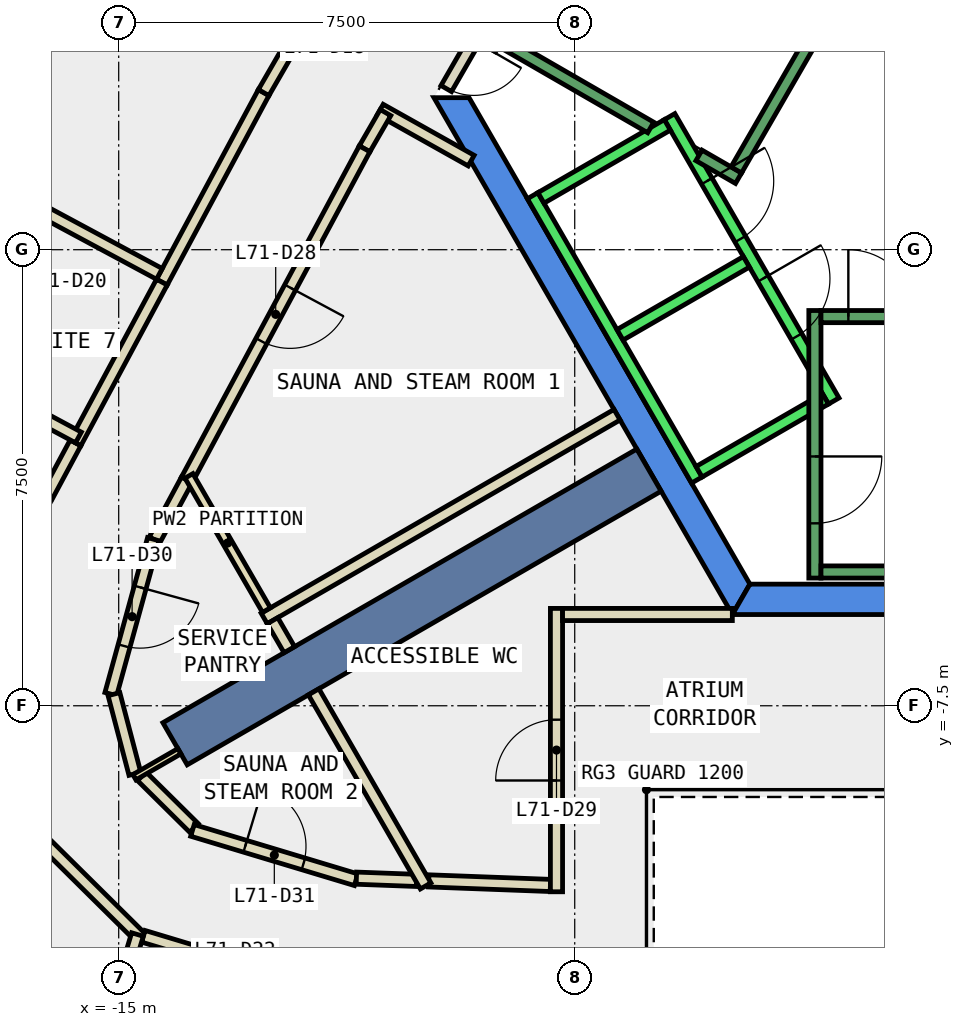
"""IFC4 building model, lengths in metres.
Left out: names, types, materials, properties, quantities, classifications, styles, units other than length and angle.
Written with IfcOpenShell. Run it as: python <this file> out.ifc"""

import sys

from ifc_helpers import new_model, si_unit, direction, frame, frame_2d, origin, place, context, subcontext, project, spatial, polyline, rectangle, outline, extrude, element, fill, save


model = new_model("IFC4")
c1 = context("Model", 3, precision=1e-05, world=origin(), true_north=direction((0.0, 1.0)))
c2 = subcontext(c1, "Body", "Model", "MODEL_VIEW")
j1 = project(units=[si_unit("LENGTHUNIT", "METRE"), si_unit("PLANEANGLEUNIT", "RADIAN")], contexts=[c1])
p1 = place(None, origin())
s1 = spatial("IfcSite", under=j1, at=p1, CompositionType="ELEMENT")
p2 = place(p1, origin())
s2 = spatial("IfcBuilding", under=s1, at=p2, CompositionType="ELEMENT")
p3 = place(p2, frame((0.0, 0.0, 304.4)))
s3 = spatial("IfcBuildingStorey", under=s2, at=p3, CompositionType="ELEMENT", Elevation=304.4)
p4 = place(p3, frame((0.0, 0.0, -0.34)))
e1 = element("IfcWall", 1, at=p4, inside=s3, PredefinedType="SHEAR", context=c2, shape_type="SweptSolid", body=[
    extrude(outline(polyline([(-9.236, 3.502), (-8.803, 3.253), (-4.619, 10.5), (-4.907, 11.0), (-9.236, 3.502)])), origin(), (0.0, 0.0, 1.0), 3.6),
])
p5 = place(p3, frame((0.0, 0.0, -0.34)))
e2 = element("IfcWall", 2, at=p5, inside=s3, PredefinedType="SHEAR", context=c2, shape_type="SweptSolid", body=[
    extrude(outline(polyline([(-9.815, 2.5), (-4.907, -6.0), (-4.619, -5.5), (-9.238, 2.5), (-9.815, 2.5)])), origin(), (0.0, 0.0, 1.0), 3.6),
])
p6 = place(p3, frame((0.0, 0.0, -0.34)))
e3 = element("IfcWall", 3, at=p6, inside=s3, PredefinedType="SHEAR", context=c2, shape_type="SweptSolid", body=[
    extrude(outline(polyline([(3.75, -6.0), (3.75, -5.5), (-4.619, -5.5), (-4.907, -6.0), (3.75, -6.0)])), origin(), (0.0, 0.0, 1.0), 3.6),
])
p7 = place(p3, frame((-6.279, -3.625, -0.34), z_axis=(0.0, 0.0, 1.0), x_axis=(-0.866017533419, -0.500013631625, 0.0)))
e4 = element("IfcWall", 4, at=p7, inside=s3, PredefinedType="SHEAR", context=c2, shape_type="SweptSolid", body=[
    extrude(rectangle(XDim=9.0, YDim=0.8, at=frame_2d((4.5, 0.0))), origin(), (0.0, 0.0, 1.0), 3.6),
])
p8 = place(p3, frame((-9.203, 1.465, 0.0), z_axis=(0.0, 0.0, 1.0), x_axis=(-0.872243753731, 0.489071399775, 0.0)))
e5 = element("IfcWall", 5, at=p8, inside=s3, PredefinedType="PARTITIONING", context=c2, shape_type="SweptSolid", body=[
    extrude(rectangle(XDim=1.715, YDim=0.2, at=frame_2d((0.858, 0.0))), origin(), (0.0, 0.0, 1.0), 3.26),
])
p9 = place(p3, frame((-10.612, 2.255, 0.0), z_axis=(0.0, 0.0, 1.0), x_axis=(-0.499916971989, -0.866073334723, 0.0)))
e6 = element("IfcWall", 6, at=p9, inside=s3, PredefinedType="PARTITIONING", context=c2, shape_type="SweptSolid", body=[
    extrude(rectangle(XDim=0.688, YDim=0.2, at=frame_2d((0.344, 0.0))), origin(), (0.0, 0.0, 1.0), 3.26),
])
p10 = place(p3, frame((-10.956, 1.659, 0.0), z_axis=(0.0, 0.0, 1.0), x_axis=(-0.473095976848, -0.881010894762, 0.0)))
e7 = element("IfcWall", 7, at=p10, inside=s3, PredefinedType="PARTITIONING", context=c2, shape_type="SweptSolid", body=[
    extrude(rectangle(XDim=6.18, YDim=0.2, at=frame_2d((3.09, 0.0))), origin(), (0.0, 0.0, 1.0), 3.26),
])
p11 = place(p10, frame((2.59, 0.0, 0.0)))
e8 = element("IfcOpeningElement", 8, at=p11, cuts=e7, PredefinedType="OPENING", context=c2, shape_type="SweptSolid", body=[
    extrude(rectangle(XDim=1.0, YDim=2.1, at=frame_2d((0.5, 1.05))), frame((0.0, 0.11, 0.0), z_axis=(0.0, -1.0, 0.0), x_axis=(1.0, 0.0, 0.0)), (0.0, 0.0, 1.0), 0.22),
])
p12 = place(p3, frame((-9.902, -10.38, 0.0), z_axis=(0.0, 0.0, 1.0), x_axis=(0.999295503749, -0.037529937222, 0.0)))
e9 = element("IfcWall", 9, at=p12, inside=s3, PredefinedType="PARTITIONING", context=c2, shape_type="SweptSolid", body=[
    extrude(rectangle(XDim=2.004, YDim=0.2, at=frame_2d((1.002, 0.0))), origin(), (0.0, 0.0, 1.0), 3.26),
])
p13 = place(p3, frame((-13.88, -3.786, 0.0), z_axis=(0.0, 0.0, 1.0), x_axis=(-0.473500327913, -0.880793641817, 0.0)))
e10 = element("IfcWall", 10, at=p13, inside=s3, PredefinedType="PARTITIONING", context=c2, shape_type="SweptSolid", body=[
    extrude(rectangle(XDim=1.117, YDim=0.2, at=frame_2d((0.559, 0.0))), origin(), (0.0, 0.0, 1.0), 3.26),
])
p14 = place(p3, frame((-14.429, -4.761, 0.0), z_axis=(0.0, 0.0, 1.0), x_axis=(-0.265321869293, -0.964159896321, 0.0)))
e11 = element("IfcWall", 11, at=p14, inside=s3, PredefinedType="PARTITIONING", context=c2, shape_type="SweptSolid", body=[
    extrude(rectangle(XDim=2.642, YDim=0.2, at=frame_2d((1.321, 0.0))), origin(), (0.0, 0.0, 1.0), 3.26),
])
p15 = place(p14, frame((0.821, 0.0, 0.0)))
e12 = element("IfcOpeningElement", 12, at=p15, cuts=e11, PredefinedType="OPENING", context=c2, shape_type="SweptSolid", body=[
    extrude(rectangle(XDim=1.0, YDim=2.1, at=frame_2d((0.5, 1.05))), frame((0.0, 0.11, 0.0), z_axis=(0.0, -1.0, 0.0), x_axis=(1.0, 0.0, 0.0)), (0.0, 0.0, 1.0), 0.22),
])
p16 = place(p3, frame((-15.078, -7.309, 0.0), z_axis=(0.0, 0.0, 1.0), x_axis=(0.254014079025, -0.967200520914, 0.0)))
e13 = element("IfcWall", 13, at=p16, inside=s3, PredefinedType="PARTITIONING", context=c2, shape_type="SweptSolid", body=[
    extrude(rectangle(XDim=1.354, YDim=0.2, at=frame_2d((0.677, 0.0))), origin(), (0.0, 0.0, 1.0), 3.26),
])
p17 = place(p3, frame((-14.62, -8.66, 0.0), z_axis=(0.0, 0.0, 1.0), x_axis=(0.710838137113, -0.703355630407, 0.0)))
e14 = element("IfcWall", 14, at=p17, inside=s3, PredefinedType="PARTITIONING", context=c2, shape_type="SweptSolid", body=[
    extrude(rectangle(XDim=1.207, YDim=0.2, at=frame_2d((0.604, 0.0))), origin(), (0.0, 0.0, 1.0), 3.26),
])
p18 = place(p3, frame((-13.787, -9.55, 0.0), z_axis=(0.0, 0.0, 1.0), x_axis=(0.957493454064, -0.288454997225, 0.0)))
e15 = element("IfcWall", 15, at=p18, inside=s3, PredefinedType="PARTITIONING", context=c2, shape_type="SweptSolid", body=[
    extrude(rectangle(XDim=2.812, YDim=0.2, at=frame_2d((1.406, 0.0))), origin(), (0.0, 0.0, 1.0), 3.26),
])
p19 = place(p18, frame((0.906, 0.0, 0.0)))
e16 = element("IfcOpeningElement", 16, at=p19, cuts=e15, PredefinedType="OPENING", context=c2, shape_type="SweptSolid", body=[
    extrude(rectangle(XDim=1.0, YDim=2.1, at=frame_2d((0.5, 1.05))), frame((0.0, 0.11, 0.0), z_axis=(0.0, -1.0, 0.0), x_axis=(1.0, 0.0, 0.0)), (0.0, 0.0, 1.0), 0.22),
])
p20 = place(p3, frame((-11.091, -10.335, 0.0), z_axis=(0.0, 0.0, 1.0), x_axis=(0.999296807198, -0.037495214686, 0.0)))
e17 = element("IfcWall", 17, at=p20, inside=s3, PredefinedType="PARTITIONING", context=c2, shape_type="SweptSolid", body=[
    extrude(rectangle(XDim=0.99, YDim=0.2, at=frame_2d((0.495, 0.0))), origin(), (0.0, 0.0, 1.0), 3.26),
])
p21 = place(p3, frame((-14.29, -0.533, 0.0), z_axis=(0.0, 0.0, 1.0), x_axis=(0.473161350875, 0.880975786295, 0.0)))
e18 = element("IfcWall", 18, at=p21, inside=s3, PredefinedType="PARTITIONING", context=c2, shape_type="SweptSolid", body=[
    extrude(rectangle(XDim=3.538, YDim=0.2, at=frame_2d((1.769, 0.0))), origin(), (0.0, 0.0, 1.0), 3.26),
])
p22 = place(p3, frame((-12.616, 2.584, 0.0), z_axis=(0.0, 0.0, 1.0), x_axis=(0.50008212199, 0.86597798544, 0.0)))
e19 = element("IfcWall", 19, at=p22, inside=s3, PredefinedType="PARTITIONING", context=c2, shape_type="SweptSolid", body=[
    extrude(rectangle(XDim=3.995, YDim=0.2, at=frame_2d((1.998, 0.0))), origin(), (0.0, 0.0, 1.0), 3.26),
])
p23 = place(p22, frame((1.498, 0.0, 0.0)))
e20 = element("IfcOpeningElement", 20, at=p23, cuts=e19, PredefinedType="OPENING", context=c2, shape_type="SweptSolid", body=[
    extrude(rectangle(XDim=1.0, YDim=2.1, at=frame_2d((0.5, 1.05))), frame((0.0, 0.11, 0.0), z_axis=(0.0, -1.0, 0.0), x_axis=(1.0, 0.0, 0.0)), (0.0, 0.0, 1.0), 0.22),
])
p24 = place(p3, frame((-16.184, -4.059, 0.0), z_axis=(0.0, 0.0, 1.0), x_axis=(0.473039108954, 0.881041430013, 0.0)))
e21 = element("IfcWall", 21, at=p24, inside=s3, PredefinedType="PARTITIONING", context=c2, shape_type="SweptSolid", body=[
    extrude(rectangle(XDim=1.002, YDim=0.2, at=frame_2d((0.501, 0.0))), origin(), (0.0, 0.0, 1.0), 3.26),
])
p25 = place(p3, frame((-15.71, -3.176, 0.0), z_axis=(0.0, 0.0, 1.0), x_axis=(0.473255284848, 0.880925329051, 0.0)))
e22 = element("IfcWall", 22, at=p25, inside=s3, PredefinedType="PARTITIONING", context=c2, shape_type="SweptSolid", body=[
    extrude(rectangle(XDim=3.0, YDim=0.2, at=frame_2d((1.5, 0.0))), origin(), (0.0, 0.0, 1.0), 3.26),
])
p26 = place(p3, frame((-14.62, -11.333, 0.0), z_axis=(0.0, 0.0, 1.0), x_axis=(-0.710808598142, 0.703385482369, 0.0)))
e23 = element("IfcWall", 23, at=p26, inside=s3, PredefinedType="PARTITIONING", context=c2, shape_type="SweptSolid", body=[
    extrude(rectangle(XDim=2.697, YDim=0.2, at=frame_2d((1.349, 0.0))), origin(), (0.0, 0.0, 1.0), 3.26),
])
p27 = place(p3, frame((-12.968, -11.781, 0.0), z_axis=(0.0, 0.0, 1.0), x_axis=(-0.957517271828, 0.288375925054, 0.0)))
e24 = element("IfcWall", 24, at=p27, inside=s3, PredefinedType="PARTITIONING", context=c2, shape_type="SweptSolid", body=[
    extrude(rectangle(XDim=1.699, YDim=0.2, at=frame_2d((0.85, 0.0))), origin(), (0.0, 0.0, 1.0), 3.26),
])
p28 = place(p3, frame((-2.54, 5.1, 0.0), z_axis=(0.0, 0.0, 1.0), x_axis=(0.499925051871, -0.866068670783, 0.0)))
e25 = element("IfcWall", 25, at=p28, inside=s3, PredefinedType="PARTITIONING", context=c2, shape_type="SweptSolid", body=[
    extrude(rectangle(XDim=5.181, YDim=0.2, at=frame_2d((2.59, 0.0))), origin(), (0.0, 0.0, 1.0), 3.26),
])
p29 = place(p28, frame((2.04, 0.0, 0.0)))
e26 = element("IfcOpeningElement", 26, at=p29, cuts=e25, PredefinedType="OPENING", context=c2, shape_type="SweptSolid", body=[
    extrude(rectangle(XDim=1.0, YDim=2.1, at=frame_2d((0.5, 1.05))), frame((0.0, 0.11, 0.0), z_axis=(0.0, -1.0, 0.0), x_axis=(1.0, 0.0, 0.0)), (0.0, 0.0, 1.0), 0.22),
])
p30 = place(p3, frame((-7.8, -10.559, 0.0), z_axis=(0.0, 0.0, 1.0), x_axis=(0.0, 1.0, 0.0)))
e27 = element("IfcWall", 27, at=p30, inside=s3, PredefinedType="PARTITIONING", context=c2, shape_type="SweptSolid", body=[
    extrude(rectangle(XDim=4.66, YDim=0.2, at=frame_2d((2.33, 0.0))), origin(), (0.0, 0.0, 1.0), 3.26),
])
p31 = place(p30, frame((1.83, 0.0, 0.0)))
e28 = element("IfcOpeningElement", 28, at=p31, cuts=e27, PredefinedType="OPENING", context=c2, shape_type="SweptSolid", body=[
    extrude(rectangle(XDim=1.0, YDim=2.1, at=frame_2d((0.5, 1.05))), frame((0.0, 0.11, 0.0), z_axis=(0.0, -1.0, 0.0), x_axis=(1.0, 0.0, 0.0)), (0.0, 0.0, 1.0), 0.22),
])
p32 = place(p3, frame((-7.7, -5.999, 0.0), z_axis=(0.0, 0.0, 1.0), x_axis=(1.0, 0.0, 0.0)))
e29 = element("IfcWall", 29, at=p32, inside=s3, PredefinedType="PARTITIONING", context=c2, shape_type="SweptSolid", body=[
    extrude(rectangle(XDim=2.792, YDim=0.2, at=frame_2d((1.396, 0.0))), origin(), (0.0, 0.0, 1.0), 3.26),
])
p33 = place(p3, frame((-6.804, -2.714, 0.0), z_axis=(0.0, 0.0, 1.0), x_axis=(-0.866057565063, -0.499944290893, 0.0)))
e30 = element("IfcWall", 30, at=p33, inside=s3, PredefinedType="PARTITIONING", context=c2, shape_type="SweptSolid", body=[
    extrude(rectangle(XDim=6.7, YDim=0.2, at=frame_2d((3.35, 0.0))), origin(), (0.0, 0.0, 1.0), 3.26),
])
p34 = place(p3, frame((-12.57, -5.927, 0.0), z_axis=(0.0, 0.0, 1.0), x_axis=(-0.500197803108, 0.865911171983, 0.0)))
e31 = element("IfcWall", 31, at=p34, inside=s3, PredefinedType="PARTITIONING", context=c2, shape_type="SweptSolid", body=[
    extrude(rectangle(XDim=2.549, YDim=0.15, at=frame_2d((1.274, 0.0))), origin(), (0.0, 0.0, 1.0), 3.26),
])
p35 = place(p3, frame((-12.194, -6.578, 0.0), z_axis=(0.0, 0.0, 1.0), x_axis=(-0.500809139387, 0.865557742676, 0.0)))
e32 = element("IfcWall", 32, at=p35, inside=s3, PredefinedType="PARTITIONING", context=c2, shape_type="SweptSolid", body=[
    extrude(rectangle(XDim=0.551, YDim=0.2, at=frame_2d((0.275, 0.0))), origin(), (0.0, 0.0, 1.0), 3.26),
])
p36 = place(p3, frame((-9.952, -10.463, 0.0), z_axis=(0.0, 0.0, 1.0), x_axis=(-0.499837150608, 0.866119404512, 0.0)))
e33 = element("IfcWall", 33, at=p36, inside=s3, PredefinedType="PARTITIONING", context=c2, shape_type="SweptSolid", body=[
    extrude(rectangle(XDim=3.685, YDim=0.2, at=frame_2d((1.843, 0.0))), origin(), (0.0, 0.0, 1.0), 3.26),
])
p37 = place(p3, frame((-14.002, -8.248, 0.0), z_axis=(0.0, 0.0, 1.0), x_axis=(-0.866142766235, -0.499796667154, 0.0)))
e34 = element("IfcWall", 34, at=p37, inside=s3, PredefinedType="PARTITIONING", context=c2, shape_type="SweptSolid", body=[
    extrude(rectangle(XDim=0.854, YDim=0.1, at=frame_2d((0.427, 0.0))), origin(), (0.0, 0.0, 1.0), 3.26),
])
p38 = place(p3, frame((-14.331, -0.398, 0.0), z_axis=(0.0, 0.0, 1.0), x_axis=(-0.880875830026, 0.473347411608, 0.0)))
e35 = element("IfcWall", 35, at=p38, inside=s3, PredefinedType="PARTITIONING", context=c2, shape_type="SweptSolid", body=[
    extrude(rectangle(XDim=2.4, YDim=0.2, at=frame_2d((1.2, 0.0))), origin(), (0.0, 0.0, 1.0), 3.26),
])
p39 = place(p3, frame((-17.865, -1.905, 0.0), z_axis=(0.0, 0.0, 1.0), x_axis=(0.881022314299, -0.473074710493, 0.0)))
e36 = element("IfcWall", 36, at=p39, inside=s3, PredefinedType="PARTITIONING", context=c2, shape_type="SweptSolid", body=[
    extrude(rectangle(XDim=2.5, YDim=0.2, at=frame_2d((1.25, 0.0))), origin(), (0.0, 0.0, 1.0), 3.26),
])
p40 = place(p3, frame((-14.691, -11.262, 0.0), z_axis=(0.0, 0.0, 1.0), x_axis=(-0.288440595492, -0.95749779262, 0.0)))
e37 = element("IfcWall", 37, at=p40, inside=s3, PredefinedType="PARTITIONING", context=c2, shape_type="SweptSolid", body=[
    extrude(rectangle(XDim=2.5, YDim=0.2, at=frame_2d((1.25, 0.0))), origin(), (0.0, 0.0, 1.0), 3.26),
])
p41 = place(p3, frame((-9.15, 3.452, 0.0), z_axis=(0.0, 0.0, 1.0), x_axis=(-0.500079945886, -0.865979242085, 0.0)))
e38 = element("IfcWall", 38, at=p41, inside=s3, PredefinedType="PARTITIONING", context=c2, shape_type="SweptSolid", body=[
    extrude(rectangle(XDim=0.926, YDim=0.2, at=frame_2d((0.463, 0.0))), origin(), (0.0, 0.0, 1.0), 2.4),
])
p42 = place(p41, frame((0.017, 0.0, 0.0)))
e39 = element("IfcOpeningElement", 39, at=p42, cuts=e38, PredefinedType="OPENING", context=c2, shape_type="SweptSolid", body=[
    extrude(rectangle(XDim=0.9, YDim=2.1, at=frame_2d((0.45, 1.05))), frame((0.0, 0.11, 0.0), z_axis=(0.0, -1.0, 0.0), x_axis=(1.0, 0.0, 0.0)), (0.0, 0.0, 1.0), 0.22),
])
p43 = place(p3, frame((-5.94, 2.188, 0.0), z_axis=(0.0, 0.0, 1.0), x_axis=(0.500034260056, -0.866005622828, 0.0)))
e40 = element("IfcWall", 40, at=p43, inside=s3, PredefinedType="STANDARD", context=c2, shape_type="SweptSolid", body=[
    extrude(rectangle(XDim=5.399, YDim=0.2, at=frame_2d((2.7, 0.0))), origin(), (0.0, 0.0, 1.0), 3.26),
])
p44 = place(p43, frame((3.075, 0.0, 0.0)))
e41 = element("IfcOpeningElement", 41, at=p44, cuts=e40, PredefinedType="OPENING", context=c2, shape_type="SweptSolid", body=[
    extrude(rectangle(XDim=1.1, YDim=2.1, at=frame_2d((0.55, 1.05))), frame((0.0, 0.11, 0.0), z_axis=(0.0, -1.0, 0.0), x_axis=(1.0, 0.0, 0.0)), (0.0, 0.0, 1.0), 0.22),
])
p45 = place(p43, frame((1.225, 0.0, 0.0)))
e42 = element("IfcOpeningElement", 42, at=p45, cuts=e40, PredefinedType="OPENING", context=c2, shape_type="SweptSolid", body=[
    extrude(rectangle(XDim=1.1, YDim=2.1, at=frame_2d((0.55, 1.05))), frame((0.0, 0.11, 0.0), z_axis=(0.0, -1.0, 0.0), x_axis=(1.0, 0.0, 0.0)), (0.0, 0.0, 1.0), 0.22),
])
p46 = place(p3, frame((-8.192, 0.888, 0.0), z_axis=(0.0, 0.0, 1.0), x_axis=(0.500034260056, -0.866005622828, 0.0)))
e43 = element("IfcWall", 43, at=p46, inside=s3, PredefinedType="STANDARD", context=c2, shape_type="SweptSolid", body=[
    extrude(rectangle(XDim=5.399, YDim=0.2, at=frame_2d((2.7, 0.0))), origin(), (0.0, 0.0, 1.0), 3.26),
])
for number, where, z_axis, x_axis in (
    (44, (-5.977, 2.052, 0.0), (0.0, 0.0, 1.0), (-0.866, -0.5, 0.0)),
    (45, (-4.677, -0.2, 0.0), (0.0, 0.0, 1.0), (-0.866, -0.5, 0.0)),
):
    element("IfcWall", number, at=place(p3, frame(where, z_axis=z_axis, x_axis=x_axis)), inside=s3, PredefinedType="STANDARD", context=c2, shape_type="SweptSolid", body=[
        extrude(rectangle(XDim=2.399, YDim=0.2, at=frame_2d((1.2, 0.0))), origin(), (0.0, 0.0, 1.0), 3.26),
    ])
p47 = place(p3, frame((-3.377, -2.452, 0.0), z_axis=(0.0, 0.0, 1.0), x_axis=(-0.865955154139, -0.50012165622, 0.0)))
e46 = element("IfcWall", 46, at=p47, inside=s3, PredefinedType="STANDARD", context=c2, shape_type="SweptSolid", body=[
    extrude(rectangle(XDim=2.4, YDim=0.2, at=frame_2d((1.2, 0.0))), origin(), (0.0, 0.0, 1.0), 3.26),
])
p48 = place(p3, frame((-3.55, -1.0, 0.0), z_axis=(0.0, 0.0, 1.0), x_axis=(0.0, -1.0, 0.0)))
e47 = element("IfcWall", 47, at=p48, inside=s3, PredefinedType="STANDARD", context=c2, shape_type="SweptSolid", body=[
    extrude(rectangle(XDim=4.4, YDim=0.2, at=frame_2d((2.2, 0.0))), origin(), (0.0, 0.0, 1.0), 3.26),
])
p49 = place(p48, frame((2.4, 0.0, 0.0)))
e48 = element("IfcOpeningElement", 48, at=p49, cuts=e47, PredefinedType="OPENING", context=c2, shape_type="SweptSolid", body=[
    extrude(rectangle(XDim=1.1, YDim=2.2, at=frame_2d((0.55, 1.1))), frame((0.0, 0.11, 0.0), z_axis=(0.0, -1.0, 0.0), x_axis=(1.0, 0.0, 0.0)), (0.0, 0.0, 1.0), 0.22),
])
p50 = place(p3, frame((-3.45, -1.1, 0.0), z_axis=(0.0, 0.0, 1.0), x_axis=(1.0, 0.0, 0.0)))
e49 = element("IfcWall", 49, at=p50, inside=s3, PredefinedType="STANDARD", context=c2, shape_type="SweptSolid", body=[
    extrude(rectangle(XDim=6.9, YDim=0.2, at=frame_2d((3.45, 0.0))), origin(), (0.0, 0.0, 1.0), 3.26),
])
p51 = place(p50, frame((0.45, 0.0, 0.0)))
e50 = element("IfcOpeningElement", 50, at=p51, cuts=e49, PredefinedType="OPENING", context=c2, shape_type="SweptSolid", body=[
    extrude(rectangle(XDim=1.1, YDim=2.2, at=frame_2d((0.55, 1.1))), frame((0.0, 0.11, 0.0), z_axis=(0.0, -1.0, 0.0), x_axis=(1.0, 0.0, 0.0)), (0.0, 0.0, 1.0), 0.22),
])
p52 = place(p3, frame((-3.45, -5.3, 0.0), z_axis=(0.0, 0.0, 1.0), x_axis=(1.0, 0.0, 0.0)))
e51 = element("IfcWall", 51, at=p52, inside=s3, PredefinedType="STANDARD", context=c2, shape_type="SweptSolid", body=[
    extrude(rectangle(XDim=6.9, YDim=0.2, at=frame_2d((3.45, 0.0))), origin(), (0.0, 0.0, 1.0), 3.26),
])
p53 = place(p3, frame((-6.25, 2.01, 0.0), z_axis=(0.0, 0.0, 1.0), x_axis=(-0.86611865017, 0.499838457731, 0.0)))
e52 = element("IfcWall", 52, at=p53, inside=s3, PredefinedType="STANDARD", context=c2, shape_type="SweptSolid", body=[
    extrude(rectangle(XDim=2.733, YDim=0.2, at=frame_2d((1.366, 0.0))), origin(), (0.0, 0.0, 1.0), 3.26),
])
p54 = place(p3, frame((-4.806, 1.176, 0.0), z_axis=(0.0, 0.0, 1.0), x_axis=(-0.866558586415, 0.499075361355, 0.0)))
e53 = element("IfcWall", 53, at=p54, inside=s3, PredefinedType="STANDARD", context=c2, shape_type="SweptSolid", body=[
    extrude(rectangle(XDim=0.751, YDim=0.2, at=frame_2d((0.376, 0.0))), origin(), (0.0, 0.0, 1.0), 3.26),
])
p55 = place(p3, frame((-1.393, 7.288, 0.0), z_axis=(0.0, 0.0, 1.0), x_axis=(-0.499963383562, -0.866046543262, 0.0)))
e54 = element("IfcWall", 54, at=p55, inside=s3, PredefinedType="STANDARD", context=c2, shape_type="SweptSolid", body=[
    extrude(rectangle(XDim=6.9, YDim=0.2, at=frame_2d((3.45, 0.0))), origin(), (0.0, 0.0, 1.0), 3.26),
])
p56 = place(p55, frame((0.45, 0.0, 0.0)))
e55 = element("IfcOpeningElement", 55, at=p56, cuts=e54, PredefinedType="OPENING", context=c2, shape_type="SweptSolid", body=[
    extrude(rectangle(XDim=1.1, YDim=2.2, at=frame_2d((0.55, 1.1))), frame((0.0, 0.11, 0.0), z_axis=(0.0, -1.0, 0.0), x_axis=(1.0, 0.0, 0.0)), (0.0, 0.0, 1.0), 0.22),
])
p57 = place(p11, origin())
e56 = element("IfcDoor", 56, at=p57, inside=s3, OperationType="SINGLE_SWING_LEFT", PredefinedType="DOOR", context=c2, shape_type="SweptSolid", body=[
    extrude(rectangle(XDim=1.0, YDim=2.1, at=frame_2d((0.5, 1.05))), frame((0.0, 0.025, 0.0), z_axis=(0.0, -1.0, 0.0), x_axis=(1.0, 0.0, 0.0)), (0.0, 0.0, 1.0), 0.05),
])
fill(e8, e56)
p58 = place(p31, origin())
e57 = element("IfcDoor", 57, at=p58, inside=s3, OperationType="SINGLE_SWING_LEFT", PredefinedType="DOOR", context=c2, shape_type="SweptSolid", body=[
    extrude(rectangle(XDim=1.0, YDim=2.1, at=frame_2d((0.5, 1.05))), frame((0.0, 0.025, 0.0), z_axis=(0.0, -1.0, 0.0), x_axis=(1.0, 0.0, 0.0)), (0.0, 0.0, 1.0), 0.05),
])
fill(e28, e57)
p59 = place(p15, origin())
e58 = element("IfcDoor", 58, at=p59, inside=s3, OperationType="SINGLE_SWING_LEFT", PredefinedType="DOOR", context=c2, shape_type="SweptSolid", body=[
    extrude(rectangle(XDim=1.0, YDim=2.1, at=frame_2d((0.5, 1.05))), frame((0.0, 0.025, 0.0), z_axis=(0.0, -1.0, 0.0), x_axis=(1.0, 0.0, 0.0)), (0.0, 0.0, 1.0), 0.05),
])
fill(e12, e58)
p60 = place(p19, origin())
e59 = element("IfcDoor", 59, at=p60, inside=s3, OperationType="SINGLE_SWING_LEFT", PredefinedType="DOOR", context=c2, shape_type="SweptSolid", body=[
    extrude(rectangle(XDim=1.0, YDim=2.1, at=frame_2d((0.5, 1.05))), frame((0.0, 0.025, 0.0), z_axis=(0.0, -1.0, 0.0), x_axis=(1.0, 0.0, 0.0)), (0.0, 0.0, 1.0), 0.05),
])
fill(e16, e59)
p61 = place(p42, origin())
e60 = element("IfcDoor", 60, at=p61, inside=s3, OperationType="SINGLE_SWING_LEFT", PredefinedType="DOOR", context=c2, shape_type="SweptSolid", body=[
    extrude(rectangle(XDim=0.9, YDim=2.1, at=frame_2d((0.45, 1.05))), frame((0.0, 0.025, 0.0), z_axis=(0.0, -1.0, 0.0), x_axis=(1.0, 0.0, 0.0)), (0.0, 0.0, 1.0), 0.05),
])
fill(e39, e60)
p62 = place(p44, origin())
e61 = element("IfcDoor", 61, at=p62, inside=s3, OperationType="SLIDING_TO_LEFT", PredefinedType="DOOR", context=c2, shape_type="SweptSolid", body=[
    extrude(rectangle(XDim=1.1, YDim=2.1, at=frame_2d((0.55, 1.05))), frame((0.0, 0.025, 0.0), z_axis=(0.0, -1.0, 0.0), x_axis=(1.0, 0.0, 0.0)), (0.0, 0.0, 1.0), 0.05),
])
fill(e41, e61)
p63 = place(p45, origin())
e62 = element("IfcDoor", 62, at=p63, inside=s3, OperationType="SLIDING_TO_LEFT", PredefinedType="DOOR", context=c2, shape_type="SweptSolid", body=[
    extrude(rectangle(XDim=1.1, YDim=2.1, at=frame_2d((0.55, 1.05))), frame((0.0, 0.025, 0.0), z_axis=(0.0, -1.0, 0.0), x_axis=(1.0, 0.0, 0.0)), (0.0, 0.0, 1.0), 0.05),
])
fill(e42, e62)
p64 = place(p51, origin())
e63 = element("IfcDoor", 63, at=p64, inside=s3, OperationType="SINGLE_SWING_LEFT", PredefinedType="DOOR", context=c2, shape_type="SweptSolid", body=[
    extrude(rectangle(XDim=1.1, YDim=2.2, at=frame_2d((0.55, 1.1))), frame((0.0, 0.025, 0.0), z_axis=(0.0, -1.0, 0.0), x_axis=(1.0, 0.0, 0.0)), (0.0, 0.0, 1.0), 0.05),
])
fill(e50, e63)
p65 = place(p49, origin())
e64 = element("IfcDoor", 64, at=p65, inside=s3, OperationType="SINGLE_SWING_LEFT", PredefinedType="DOOR", context=c2, shape_type="SweptSolid", body=[
    extrude(rectangle(XDim=1.1, YDim=2.2, at=frame_2d((0.55, 1.1))), frame((0.0, 0.025, 0.0), z_axis=(0.0, -1.0, 0.0), x_axis=(1.0, 0.0, 0.0)), (0.0, 0.0, 1.0), 0.05),
])
fill(e48, e64)
save(model, sys.argv[1])
